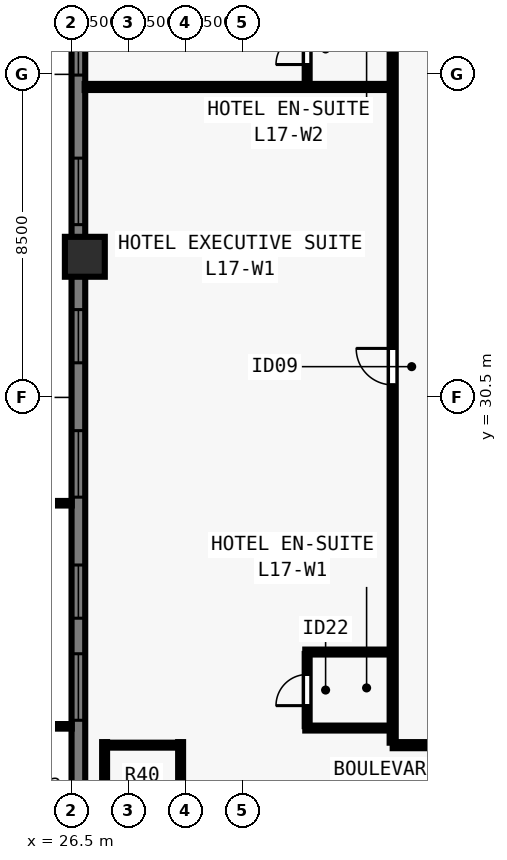
"""IFC4 building model, lengths in metres.
Left out: names, types, materials, properties, quantities, classifications, styles, units other than length and angle.
Written with IfcOpenShell. Run it as: python <this file> out.ifc"""

import sys

from ifc_helpers import new_model, si_unit, direction, frame, frame_2d, origin, origin_2d, place, context, subcontext, project, spatial, rectangle, extrude, element, fill, save


model = new_model("IFC4")
c1 = context("Model", 3, precision=1e-05, world=origin(), true_north=direction((0.0, 1.0)))
c2 = subcontext(c1, "Body", "Model", "MODEL_VIEW")
j1 = project(units=[si_unit("LENGTHUNIT", "METRE"), si_unit("PLANEANGLEUNIT", "RADIAN")], contexts=[c1])
p1 = place(None, origin())
s1 = spatial("IfcSite", under=j1, at=p1, CompositionType="ELEMENT")
p2 = place(p1, origin())
s2 = spatial("IfcBuilding", under=s1, at=p2, CompositionType="ELEMENT")
p3 = place(p2, frame((0.0, 0.0, 65.5)))
s3 = spatial("IfcBuildingStorey", under=s2, at=p3, CompositionType="ELEMENT", Elevation=65.5)
p4 = place(p3, frame((26.85, 34.2, 0.0), z_axis=(0.0, 0.0, 1.0), x_axis=(0.0, 1.0, 0.0)))
e1 = element("IfcColumn", 1, at=p4, inside=s3, PredefinedType="COLUMN", context=c2, shape_type="SweptSolid", body=[
    extrude(rectangle(XDim=1.05, YDim=1.05, at=origin_2d()), origin(), (0.0, 0.0, 1.0), 3.5),
])
p5 = place(p3, frame((26.68, 16.5, 0.0), z_axis=(0.0, 0.0, 1.0), x_axis=(0.0, 1.0, 0.0)))
e2 = element("IfcWall", 2, at=p5, inside=s3, PredefinedType="SOLIDWALL", context=c2, shape_type="SweptSolid", body=[
    extrude(rectangle(XDim=44.662, YDim=0.36, at=frame_2d((22.331, 0.0))), origin(), (0.0, 0.0, 1.0), 3.28),
])
p6 = place(p5, frame((5.505, 0.0, 0.8)))
e3 = element("IfcOpeningElement", 3, at=p6, cuts=e2, PredefinedType="OPENING", context=c2, shape_type="SweptSolid", body=[
    extrude(rectangle(XDim=1.75, YDim=1.544, at=frame_2d((0.875, 0.772))), frame((0.0, 0.19, 0.0), z_axis=(0.0, -1.0, 0.0), x_axis=(1.0, 0.0, 0.0)), (0.0, 0.0, 1.0), 0.38),
])
p7 = place(p5, frame((8.19, 0.0, 0.8)))
e4 = element("IfcOpeningElement", 4, at=p7, cuts=e2, PredefinedType="OPENING", context=c2, shape_type="SweptSolid", body=[
    extrude(rectangle(XDim=1.4, YDim=1.544, at=frame_2d((0.7, 0.772))), frame((0.0, 0.19, 0.0), z_axis=(0.0, -1.0, 0.0), x_axis=(1.0, 0.0, 0.0)), (0.0, 0.0, 1.0), 0.38),
])
p8 = place(p5, frame((11.375, 0.0, 0.8)))
e5 = element("IfcOpeningElement", 5, at=p8, cuts=e2, PredefinedType="OPENING", context=c2, shape_type="SweptSolid", body=[
    extrude(rectangle(XDim=1.75, YDim=1.544, at=frame_2d((0.875, 0.772))), frame((0.0, 0.19, 0.0), z_axis=(0.0, -1.0, 0.0), x_axis=(1.0, 0.0, 0.0)), (0.0, 0.0, 1.0), 0.38),
])
p9 = place(p5, frame((14.911, 0.0, 0.8)))
e6 = element("IfcOpeningElement", 6, at=p9, cuts=e2, PredefinedType="OPENING", context=c2, shape_type="SweptSolid", body=[
    extrude(rectangle(XDim=1.4, YDim=1.544, at=frame_2d((0.7, 0.772))), frame((0.0, 0.19, 0.0), z_axis=(0.0, -1.0, 0.0), x_axis=(1.0, 0.0, 0.0)), (0.0, 0.0, 1.0), 0.38),
])
p10 = place(p5, frame((18.546, 0.0, 0.8)))
e7 = element("IfcOpeningElement", 7, at=p10, cuts=e2, PredefinedType="OPENING", context=c2, shape_type="SweptSolid", body=[
    extrude(rectangle(XDim=1.75, YDim=1.544, at=frame_2d((0.875, 0.772))), frame((0.0, 0.19, 0.0), z_axis=(0.0, -1.0, 0.0), x_axis=(1.0, 0.0, 0.0)), (0.0, 0.0, 1.0), 0.38),
])
p11 = place(p5, frame((22.481, 0.0, 0.8)))
e8 = element("IfcOpeningElement", 8, at=p11, cuts=e2, PredefinedType="OPENING", context=c2, shape_type="SweptSolid", body=[
    extrude(rectangle(XDim=1.4, YDim=1.544, at=frame_2d((0.7, 0.772))), frame((0.0, 0.19, 0.0), z_axis=(0.0, -1.0, 0.0), x_axis=(1.0, 0.0, 0.0)), (0.0, 0.0, 1.0), 0.38),
])
p12 = place(p5, frame((24.366, 0.0, 0.8)))
e9 = element("IfcOpeningElement", 9, at=p12, cuts=e2, PredefinedType="OPENING", context=c2, shape_type="SweptSolid", body=[
    extrude(rectangle(XDim=1.75, YDim=1.544, at=frame_2d((0.875, 0.772))), frame((0.0, 0.19, 0.0), z_axis=(0.0, -1.0, 0.0), x_axis=(1.0, 0.0, 0.0)), (0.0, 0.0, 1.0), 0.38),
])
p13 = place(p5, frame((28.351, 0.0, 0.8)))
e10 = element("IfcOpeningElement", 10, at=p13, cuts=e2, PredefinedType="OPENING", context=c2, shape_type="SweptSolid", body=[
    extrude(rectangle(XDim=1.4, YDim=1.544, at=frame_2d((0.7, 0.772))), frame((0.0, 0.19, 0.0), z_axis=(0.0, -1.0, 0.0), x_axis=(1.0, 0.0, 0.0)), (0.0, 0.0, 1.0), 0.38),
])
p14 = place(p5, frame((31.537, 0.0, 0.8)))
e11 = element("IfcOpeningElement", 11, at=p14, cuts=e2, PredefinedType="OPENING", context=c2, shape_type="SweptSolid", body=[
    extrude(rectangle(XDim=1.75, YDim=1.544, at=frame_2d((0.875, 0.772))), frame((0.0, 0.19, 0.0), z_axis=(0.0, -1.0, 0.0), x_axis=(1.0, 0.0, 0.0)), (0.0, 0.0, 1.0), 0.38),
])
p15 = place(p5, frame((35.072, 0.0, 0.8)))
e12 = element("IfcOpeningElement", 12, at=p15, cuts=e2, PredefinedType="OPENING", context=c2, shape_type="SweptSolid", body=[
    extrude(rectangle(XDim=1.4, YDim=1.544, at=frame_2d((0.7, 0.772))), frame((0.0, 0.19, 0.0), z_axis=(0.0, -1.0, 0.0), x_axis=(1.0, 0.0, 0.0)), (0.0, 0.0, 1.0), 0.38),
])
p16 = place(p5, frame((37.807, 0.0, 0.8)))
e13 = element("IfcOpeningElement", 13, at=p16, cuts=e2, PredefinedType="OPENING", context=c2, shape_type="SweptSolid", body=[
    extrude(rectangle(XDim=1.75, YDim=1.544, at=frame_2d((0.875, 0.772))), frame((0.0, 0.19, 0.0), z_axis=(0.0, -1.0, 0.0), x_axis=(1.0, 0.0, 0.0)), (0.0, 0.0, 1.0), 0.38),
])
p17 = place(p3, frame((34.95, 21.35, 0.0), z_axis=(0.0, 0.0, 1.0), x_axis=(1.0, 0.0, 0.0)))
e14 = element("IfcWall", 14, at=p17, inside=s3, PredefinedType="PARTITIONING", context=c2, shape_type="SweptSolid", body=[
    extrude(rectangle(XDim=34.1, YDim=0.16, at=frame_2d((17.05, 0.0))), origin(), (0.0, 0.0, 1.0), 3.28),
])
p18 = place(p17, frame((3.614, 0.0, 0.0)))
e15 = element("IfcOpeningElement", 15, at=p18, cuts=e14, PredefinedType="OPENING", context=c2, shape_type="SweptSolid", body=[
    extrude(rectangle(XDim=0.96, YDim=2.15, at=frame_2d((0.48, 1.075))), frame((0.0, 0.09, 0.0), z_axis=(0.0, -1.0, 0.0), x_axis=(1.0, 0.0, 0.0)), (0.0, 0.0, 1.0), 0.18),
])
p19 = place(p17, frame((17.56, 0.0, 0.0)))
e16 = element("IfcOpeningElement", 16, at=p19, cuts=e14, PredefinedType="OPENING", context=c2, shape_type="SweptSolid", body=[
    extrude(rectangle(XDim=0.96, YDim=2.15, at=frame_2d((0.48, 1.075))), frame((0.0, 0.09, 0.0), z_axis=(0.0, -1.0, 0.0), x_axis=(1.0, 0.0, 0.0)), (0.0, 0.0, 1.0), 0.18),
])
p20 = place(p17, frame((30.516, 0.0, 0.0)))
e17 = element("IfcOpeningElement", 17, at=p20, cuts=e14, PredefinedType="OPENING", context=c2, shape_type="SweptSolid", body=[
    extrude(rectangle(XDim=0.96, YDim=2.15, at=frame_2d((0.48, 1.075))), frame((0.0, 0.09, 0.0), z_axis=(0.0, -1.0, 0.0), x_axis=(1.0, 0.0, 0.0)), (0.0, 0.0, 1.0), 0.18),
])
p21 = place(p3, frame((34.95, 21.415, 0.0), z_axis=(0.0, 0.0, 1.0), x_axis=(0.0, 1.0, 0.0)))
e18 = element("IfcWall", 18, at=p21, inside=s3, PredefinedType="PARTITIONING", context=c2, shape_type="SweptSolid", body=[
    extrude(rectangle(XDim=35.17, YDim=0.16, at=frame_2d((17.585, 0.0))), origin(), (0.0, 0.0, 1.0), 3.28),
])
p22 = place(p21, frame((9.414, 0.0, 0.0)))
e19 = element("IfcOpeningElement", 19, at=p22, cuts=e18, PredefinedType="OPENING", context=c2, shape_type="SweptSolid", body=[
    extrude(rectangle(XDim=0.96, YDim=2.15, at=frame_2d((0.48, 1.075))), frame((0.0, 0.09, 0.0), z_axis=(0.0, -1.0, 0.0), x_axis=(1.0, 0.0, 0.0)), (0.0, 0.0, 1.0), 0.18),
])
p23 = place(p21, frame((26.814, 0.0, 0.0)))
e20 = element("IfcOpeningElement", 20, at=p23, cuts=e18, PredefinedType="OPENING", context=c2, shape_type="SweptSolid", body=[
    extrude(rectangle(XDim=0.96, YDim=2.15, at=frame_2d((0.48, 1.075))), frame((0.0, 0.09, 0.0), z_axis=(0.0, -1.0, 0.0), x_axis=(1.0, 0.0, 0.0)), (0.0, 0.0, 1.0), 0.18),
])
for number, where, z_axis, x_axis in (
    (21, (27.37, 19.05, 0.0), (0.0, 0.0, 1.0), (0.0, 1.0, 0.0)),
    (22, (29.37, 19.05, 0.0), (0.0, 0.0, 1.0), (0.0, 1.0, 0.0)),
):
    element("IfcWall", number, at=place(p3, frame(where, z_axis=z_axis, x_axis=x_axis)), inside=s3, PredefinedType="PLUMBINGWALL", context=c2, shape_type="SweptSolid", body=[
        extrude(rectangle(XDim=2.38, YDim=0.13, at=frame_2d((1.19, 0.0))), origin(), (0.0, 0.0, 1.0), 3.28),
    ])
p24 = place(p3, frame((27.42, 21.35, 0.0), z_axis=(0.0, 0.0, 1.0), x_axis=(1.0, 0.0, 0.0)))
e23 = element("IfcWall", 23, at=p24, inside=s3, PredefinedType="PLUMBINGWALL", context=c2, shape_type="SweptSolid", body=[
    extrude(rectangle(XDim=1.9, YDim=0.13, at=frame_2d((0.95, 0.0))), origin(), (0.0, 0.0, 1.0), 3.28),
])
p25 = place(p3, frame((32.65, 21.8, 0.0), z_axis=(0.0, 0.0, 1.0), x_axis=(1.0, 0.0, 0.0)))
e24 = element("IfcWall", 24, at=p25, inside=s3, PredefinedType="PLUMBINGWALL", context=c2, shape_type="SweptSolid", body=[
    extrude(rectangle(XDim=2.235, YDim=0.13, at=frame_2d((1.118, 0.0))), origin(), (0.0, 0.0, 1.0), 2.849),
])
p26 = place(p3, frame((32.65, 23.8, 0.0), z_axis=(0.0, 0.0, 1.0), x_axis=(1.0, 0.0, 0.0)))
e25 = element("IfcWall", 25, at=p26, inside=s3, PredefinedType="PLUMBINGWALL", context=c2, shape_type="SweptSolid", body=[
    extrude(rectangle(XDim=2.235, YDim=0.13, at=frame_2d((1.118, 0.0))), origin(), (0.0, 0.0, 1.0), 3.28),
])
p27 = place(p3, frame((32.7, 21.85, 0.0), z_axis=(0.0, 0.0, 1.0), x_axis=(0.0, 1.0, 0.0)))
e26 = element("IfcWall", 26, at=p27, inside=s3, PredefinedType="PLUMBINGWALL", context=c2, shape_type="SweptSolid", body=[
    extrude(rectangle(XDim=1.9, YDim=0.13, at=frame_2d((0.95, 0.0))), origin(), (0.0, 0.0, 1.0), 3.28),
])
p28 = place(p27, frame((0.54, 0.0, 0.0)))
e27 = element("IfcOpeningElement", 27, at=p28, cuts=e26, PredefinedType="OPENING", context=c2, shape_type="SweptSolid", body=[
    extrude(rectangle(XDim=0.82, YDim=2.1, at=frame_2d((0.41, 1.05))), frame((0.0, 0.075, 0.0), z_axis=(0.0, -1.0, 0.0), x_axis=(1.0, 0.0, 0.0)), (0.0, 0.0, 1.0), 0.15),
])
p29 = place(p3, frame((26.845, 38.668, 0.0), z_axis=(0.0, 0.0, 1.0), x_axis=(1.0, 0.0, 0.0)))
e28 = element("IfcWall", 28, at=p29, inside=s3, PredefinedType="PARTITIONING", context=c2, shape_type="SweptSolid", body=[
    extrude(rectangle(XDim=8.04, YDim=0.16, at=frame_2d((4.02, 0.0))), origin(), (0.0, 0.0, 1.0), 2.849),
])
p30 = place(p3, frame((32.7, 38.733, 0.0), z_axis=(0.0, 0.0, 1.0), x_axis=(0.0, 1.0, 0.0)))
e29 = element("IfcWall", 29, at=p30, inside=s3, PredefinedType="PLUMBINGWALL", context=c2, shape_type="SweptSolid", body=[
    extrude(rectangle(XDim=1.885, YDim=0.13, at=frame_2d((0.942, 0.0))), origin(), (0.0, 0.0, 1.0), 3.28),
])
p31 = place(p30, frame((0.525, 0.0, 0.0)))
e30 = element("IfcOpeningElement", 30, at=p31, cuts=e29, PredefinedType="OPENING", context=c2, shape_type="SweptSolid", body=[
    extrude(rectangle(XDim=0.82, YDim=2.1, at=frame_2d((0.41, 1.05))), frame((0.0, 0.075, 0.0), z_axis=(0.0, -1.0, 0.0), x_axis=(1.0, 0.0, 0.0)), (0.0, 0.0, 1.0), 0.15),
])
p32 = place(p6, origin())
e31 = element("IfcWindow", 31, at=p32, inside=s3, PartitioningType="SINGLE_PANEL", PredefinedType="WINDOW", context=c2, shape_type="SweptSolid", body=[
    extrude(rectangle(XDim=1.75, YDim=1.544, at=frame_2d((0.875, 0.772))), frame((0.0, -0.05, 0.0), z_axis=(0.0, -1.0, 0.0), x_axis=(1.0, 0.0, 0.0)), (0.0, 0.0, 1.0), 0.06),
])
fill(e3, e31)
p33 = place(p7, origin())
e32 = element("IfcWindow", 32, at=p33, inside=s3, PartitioningType="SINGLE_PANEL", PredefinedType="WINDOW", context=c2, shape_type="SweptSolid", body=[
    extrude(rectangle(XDim=1.4, YDim=1.544, at=frame_2d((0.7, 0.772))), frame((0.0, -0.05, 0.0), z_axis=(0.0, -1.0, 0.0), x_axis=(1.0, 0.0, 0.0)), (0.0, 0.0, 1.0), 0.06),
])
fill(e4, e32)
p34 = place(p8, origin())
e33 = element("IfcWindow", 33, at=p34, inside=s3, PartitioningType="SINGLE_PANEL", PredefinedType="WINDOW", context=c2, shape_type="SweptSolid", body=[
    extrude(rectangle(XDim=1.75, YDim=1.544, at=frame_2d((0.875, 0.772))), frame((0.0, -0.05, 0.0), z_axis=(0.0, -1.0, 0.0), x_axis=(1.0, 0.0, 0.0)), (0.0, 0.0, 1.0), 0.06),
])
fill(e5, e33)
p35 = place(p9, origin())
e34 = element("IfcWindow", 34, at=p35, inside=s3, PartitioningType="SINGLE_PANEL", PredefinedType="WINDOW", context=c2, shape_type="SweptSolid", body=[
    extrude(rectangle(XDim=1.4, YDim=1.544, at=frame_2d((0.7, 0.772))), frame((0.0, -0.05, 0.0), z_axis=(0.0, -1.0, 0.0), x_axis=(1.0, 0.0, 0.0)), (0.0, 0.0, 1.0), 0.06),
])
fill(e6, e34)
p36 = place(p10, origin())
e35 = element("IfcWindow", 35, at=p36, inside=s3, PartitioningType="SINGLE_PANEL", PredefinedType="WINDOW", context=c2, shape_type="SweptSolid", body=[
    extrude(rectangle(XDim=1.75, YDim=1.544, at=frame_2d((0.875, 0.772))), frame((0.0, -0.05, 0.0), z_axis=(0.0, -1.0, 0.0), x_axis=(1.0, 0.0, 0.0)), (0.0, 0.0, 1.0), 0.06),
])
fill(e7, e35)
p37 = place(p11, origin())
e36 = element("IfcWindow", 36, at=p37, inside=s3, PartitioningType="SINGLE_PANEL", PredefinedType="WINDOW", context=c2, shape_type="SweptSolid", body=[
    extrude(rectangle(XDim=1.4, YDim=1.544, at=frame_2d((0.7, 0.772))), frame((0.0, -0.05, 0.0), z_axis=(0.0, -1.0, 0.0), x_axis=(1.0, 0.0, 0.0)), (0.0, 0.0, 1.0), 0.06),
])
fill(e8, e36)
p38 = place(p28, origin())
e37 = element("IfcDoor", 37, at=p38, inside=s3, OperationType="SINGLE_SWING_LEFT", PredefinedType="DOOR", context=c2, shape_type="SweptSolid", body=[
    extrude(rectangle(XDim=0.82, YDim=2.1, at=frame_2d((0.41, 1.05))), frame((0.0, 0.025, 0.0), z_axis=(0.0, -1.0, 0.0), x_axis=(1.0, 0.0, 0.0)), (0.0, 0.0, 1.0), 0.05),
])
fill(e27, e37)
p39 = place(p22, origin())
e38 = element("IfcDoor", 38, at=p39, inside=s3, OperationType="SINGLE_SWING_RIGHT", PredefinedType="DOOR", context=c2, shape_type="SweptSolid", body=[
    extrude(rectangle(XDim=0.96, YDim=2.15, at=frame_2d((0.48, 1.075))), frame((0.0, 0.025, 0.0), z_axis=(0.0, -1.0, 0.0), x_axis=(1.0, 0.0, 0.0)), (0.0, 0.0, 1.0), 0.05),
])
fill(e19, e38)
p40 = place(p31, origin())
e39 = element("IfcDoor", 39, at=p40, inside=s3, OperationType="SINGLE_SWING_LEFT", PredefinedType="DOOR", context=c2, shape_type="SweptSolid", body=[
    extrude(rectangle(XDim=0.82, YDim=2.1, at=frame_2d((0.41, 1.05))), frame((0.0, 0.025, 0.0), z_axis=(0.0, -1.0, 0.0), x_axis=(1.0, 0.0, 0.0)), (0.0, 0.0, 1.0), 0.05),
])
fill(e30, e39)
save(model, sys.argv[1])
